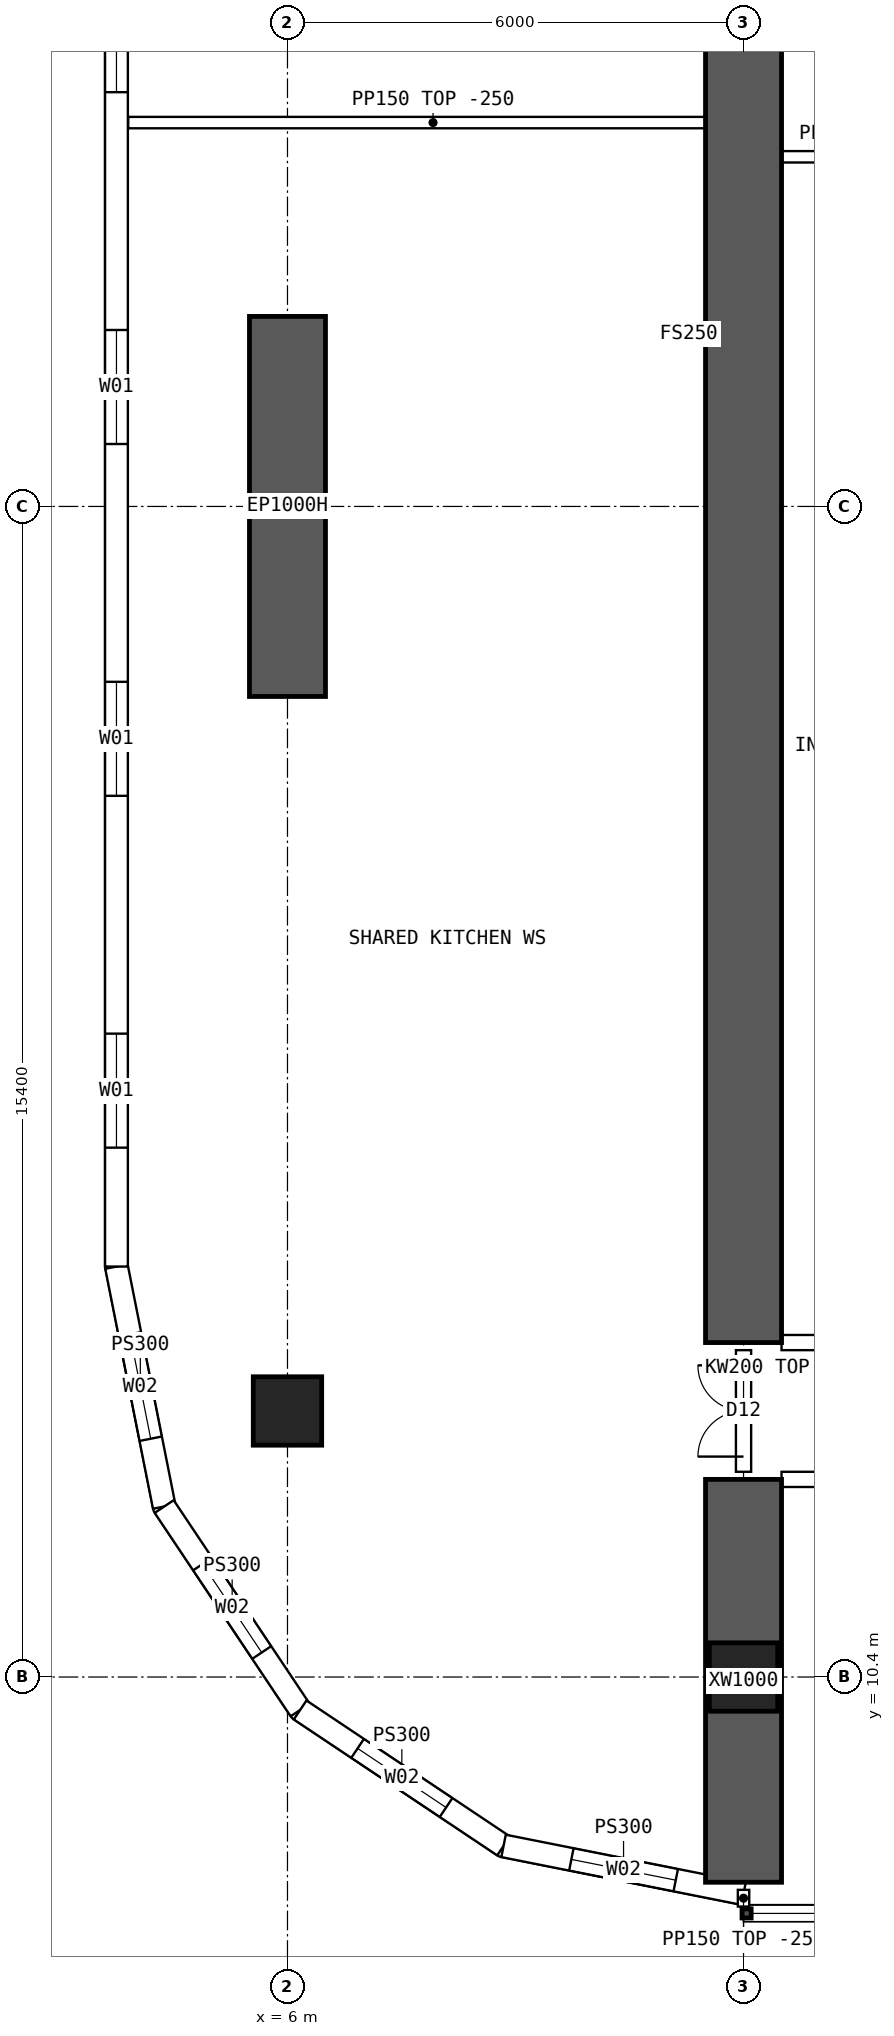
"""IFC4 building model, lengths in metres.
Left out: names, types, materials, properties, quantities, classifications, styles, units other than length and angle.
Written with IfcOpenShell. Run it as: python <this file> out.ifc"""

import sys

from ifc_helpers import new_model, si_unit, direction, frame, frame_2d, origin, origin_2d, place, context, subcontext, project, spatial, polyline, rectangle, hollow_rectangle, outline, extrude, element, fill, save


model = new_model("IFC4")
c1 = context("Model", 3, precision=1e-05, world=origin(), true_north=direction((0.0, 1.0)))
c2 = subcontext(c1, "Body", "Model", "MODEL_VIEW")
j1 = project(units=[si_unit("LENGTHUNIT", "METRE"), si_unit("PLANEANGLEUNIT", "RADIAN")], contexts=[c1])
p1 = place(None, origin())
s1 = spatial("IfcSite", under=j1, at=p1, CompositionType="ELEMENT")
p2 = place(p1, origin())
s2 = spatial("IfcBuilding", under=s1, at=p2, CompositionType="ELEMENT")
p3 = place(p2, frame((0.0, 0.0, 57.7)))
s3 = spatial("IfcBuildingStorey", under=s2, at=p3, CompositionType="ELEMENT", Elevation=57.7)
for number, where, z_axis, x_axis in (
    (1, (12.0, 10.4, 0.0), (0.0, 0.0, 1.0), (1.0, 0.0, 0.0)),
    (2, (6.0, 13.9, 0.0), (0.0, 0.0, 1.0), (1.0, 0.0, 0.0)),
):
    element("IfcColumn", number, at=place(p3, frame(where, z_axis=z_axis, x_axis=x_axis)), inside=s3, PredefinedType="COLUMN", context=c2, shape_type="SweptSolid", body=[
        extrude(hollow_rectangle(XDim=0.9, YDim=0.9, WallThickness=0.09, at=origin_2d()), origin(), (0.0, 0.0, 1.0), 3.75),
    ])
p4 = place(p3, frame((6.0, 23.3, 0.0), z_axis=(0.0, 0.0, 1.0), x_axis=(0.0, 1.0, 0.0)))
e3 = element("IfcWall", 3, at=p4, inside=s3, PredefinedType="SHEAR", context=c2, shape_type="SweptSolid", body=[
    extrude(rectangle(XDim=5.0, YDim=1.0, at=frame_2d((2.5, 0.0))), origin(), (0.0, 0.0, 1.0), 3.75),
])
p5 = place(p3, frame((12.0, 7.7, 0.0), z_axis=(0.0, 0.0, 1.0), x_axis=(0.0, 1.0, 0.0)))
e4 = element("IfcWall", 4, at=p5, inside=s3, PredefinedType="SHEAR", context=c2, shape_type="SweptSolid", body=[
    extrude(rectangle(XDim=5.3, YDim=1.0, at=frame_2d((2.65, 0.0))), origin(), (0.0, 0.0, 1.0), 3.75),
])
p6 = place(p3, frame((12.0, 14.8, 0.0), z_axis=(0.0, 0.0, 1.0), x_axis=(0.0, 1.0, 0.0)))
e5 = element("IfcWall", 5, at=p6, inside=s3, PredefinedType="SHEAR", context=c2, shape_type="SweptSolid", body=[
    extrude(rectangle(XDim=34.4, YDim=1.0, at=frame_2d((17.2, 0.0))), origin(), (0.0, 0.0, 1.0), 3.75),
])
p7 = place(p3, frame((3.75, 48.2, 0.0), z_axis=(0.0, 0.0, 1.0), x_axis=(0.0, -1.0, 0.0)))
e6 = element("IfcWall", 6, at=p7, inside=s3, PredefinedType="SOLIDWALL", context=c2, shape_type="SweptSolid", body=[
    extrude(outline(polyline([(-0.015, -0.15), (32.415, -0.15), (32.385, 0.15), (0.015, 0.15), (-0.015, -0.15)])), origin(), (0.0, 0.0, 1.0), 3.5),
])
p8 = place(p7, frame((1.564, 0.0, 0.9)))
e7 = element("IfcOpeningElement", 7, at=p8, cuts=e6, PredefinedType="OPENING", context=c2, shape_type="SweptSolid", body=[
    extrude(rectangle(XDim=1.5, YDim=2.0, at=frame_2d((0.75, 1.0))), frame((0.0, 0.16, 0.0), z_axis=(0.0, -1.0, 0.0), x_axis=(1.0, 0.0, 0.0)), (0.0, 0.0, 1.0), 0.32),
])
p9 = place(p7, frame((6.193, 0.0, 0.9)))
e8 = element("IfcOpeningElement", 8, at=p9, cuts=e6, PredefinedType="OPENING", context=c2, shape_type="SweptSolid", body=[
    extrude(rectangle(XDim=1.5, YDim=2.0, at=frame_2d((0.75, 1.0))), frame((0.0, 0.16, 0.0), z_axis=(0.0, -1.0, 0.0), x_axis=(1.0, 0.0, 0.0)), (0.0, 0.0, 1.0), 0.32),
])
p10 = place(p7, frame((10.822, 0.0, 0.9)))
e9 = element("IfcOpeningElement", 9, at=p10, cuts=e6, PredefinedType="OPENING", context=c2, shape_type="SweptSolid", body=[
    extrude(rectangle(XDim=1.5, YDim=2.0, at=frame_2d((0.75, 1.0))), frame((0.0, 0.16, 0.0), z_axis=(0.0, -1.0, 0.0), x_axis=(1.0, 0.0, 0.0)), (0.0, 0.0, 1.0), 0.32),
])
p11 = place(p7, frame((15.45, 0.0, 0.9)))
e10 = element("IfcOpeningElement", 10, at=p11, cuts=e6, PredefinedType="OPENING", context=c2, shape_type="SweptSolid", body=[
    extrude(rectangle(XDim=1.5, YDim=2.0, at=frame_2d((0.75, 1.0))), frame((0.0, 0.16, 0.0), z_axis=(0.0, -1.0, 0.0), x_axis=(1.0, 0.0, 0.0)), (0.0, 0.0, 1.0), 0.32),
])
p12 = place(p7, frame((20.079, 0.0, 0.9)))
e11 = element("IfcOpeningElement", 11, at=p12, cuts=e6, PredefinedType="OPENING", context=c2, shape_type="SweptSolid", body=[
    extrude(rectangle(XDim=1.5, YDim=2.0, at=frame_2d((0.75, 1.0))), frame((0.0, 0.16, 0.0), z_axis=(0.0, -1.0, 0.0), x_axis=(1.0, 0.0, 0.0)), (0.0, 0.0, 1.0), 0.32),
])
p13 = place(p7, frame((24.707, 0.0, 0.9)))
e12 = element("IfcOpeningElement", 12, at=p13, cuts=e6, PredefinedType="OPENING", context=c2, shape_type="SweptSolid", body=[
    extrude(rectangle(XDim=1.5, YDim=2.0, at=frame_2d((0.75, 1.0))), frame((0.0, 0.16, 0.0), z_axis=(0.0, -1.0, 0.0), x_axis=(1.0, 0.0, 0.0)), (0.0, 0.0, 1.0), 0.32),
])
p14 = place(p7, frame((29.336, 0.0, 0.9)))
e13 = element("IfcOpeningElement", 13, at=p14, cuts=e6, PredefinedType="OPENING", context=c2, shape_type="SweptSolid", body=[
    extrude(rectangle(XDim=1.5, YDim=2.0, at=frame_2d((0.75, 1.0))), frame((0.0, 0.16, 0.0), z_axis=(0.0, -1.0, 0.0), x_axis=(1.0, 0.0, 0.0)), (0.0, 0.0, 1.0), 0.32),
])
p15 = place(p3, frame((3.75, 15.8, 0.0), z_axis=(0.0, 0.0, 1.0), x_axis=(0.195065901187, -0.980790137692, 0.0)))
e14 = element("IfcWall", 14, at=p15, inside=s3, PredefinedType="SOLIDWALL", context=c2, shape_type="SweptSolid", body=[
    extrude(outline(polyline([(-0.015, -0.15), (3.249, -0.15), (3.189, 0.15), (0.015, 0.15), (-0.015, -0.15)])), origin(), (0.0, 0.0, 1.0), 3.5),
])
p16 = place(p15, frame((0.909, 0.0, 0.9)))
e15 = element("IfcOpeningElement", 15, at=p16, cuts=e14, PredefinedType="OPENING", context=c2, shape_type="SweptSolid", body=[
    extrude(rectangle(XDim=1.4, YDim=1.8, at=frame_2d((0.7, 0.9))), frame((0.0, 0.16, 0.0), z_axis=(0.0, -1.0, 0.0), x_axis=(1.0, 0.0, 0.0)), (0.0, 0.0, 1.0), 0.32),
])
p17 = place(p3, frame((4.378, 12.643, 0.0), z_axis=(0.0, 0.0, 1.0), x_axis=(0.555609954424, -0.831443069936, 0.0)))
e16 = element("IfcWall", 16, at=p17, inside=s3, PredefinedType="SOLIDWALL", context=c2, shape_type="SweptSolid", body=[
    extrude(outline(polyline([(-0.03, -0.15), (3.249, -0.15), (3.189, 0.15), (0.03, 0.15), (-0.03, -0.15)])), origin(), (0.0, 0.0, 1.0), 3.5),
])
p18 = place(p17, frame((0.909, 0.0, 0.9)))
e17 = element("IfcOpeningElement", 17, at=p18, cuts=e16, PredefinedType="OPENING", context=c2, shape_type="SweptSolid", body=[
    extrude(rectangle(XDim=1.4, YDim=1.8, at=frame_2d((0.7, 0.9))), frame((0.0, 0.16, 0.0), z_axis=(0.0, -1.0, 0.0), x_axis=(1.0, 0.0, 0.0)), (0.0, 0.0, 1.0), 0.32),
])
p19 = place(p3, frame((6.167, 9.966, 0.0), z_axis=(0.0, 0.0, 1.0), x_axis=(0.831478105043, -0.555557522525, 0.0)))
e18 = element("IfcWall", 18, at=p19, inside=s3, PredefinedType="SOLIDWALL", context=c2, shape_type="SweptSolid", body=[
    extrude(outline(polyline([(-0.03, -0.15), (3.249, -0.15), (3.189, 0.15), (0.03, 0.15), (-0.03, -0.15)])), origin(), (0.0, 0.0, 1.0), 3.5),
])
p20 = place(p19, frame((0.909, 0.0, 0.9)))
e19 = element("IfcOpeningElement", 19, at=p20, cuts=e18, PredefinedType="OPENING", context=c2, shape_type="SweptSolid", body=[
    extrude(rectangle(XDim=1.4, YDim=1.8, at=frame_2d((0.7, 0.9))), frame((0.0, 0.16, 0.0), z_axis=(0.0, -1.0, 0.0), x_axis=(1.0, 0.0, 0.0)), (0.0, 0.0, 1.0), 0.32),
])
p21 = place(p3, frame((8.843, 8.178, 0.0), z_axis=(0.0, 0.0, 1.0), x_axis=(0.980787251524, -0.195080412259, 0.0)))
e20 = element("IfcWall", 20, at=p21, inside=s3, PredefinedType="SOLIDWALL", context=c2, shape_type="SweptSolid", body=[
    extrude(outline(polyline([(-0.03, -0.15), (3.249, -0.15), (3.189, 0.15), (0.03, 0.15), (-0.03, -0.15)])), origin(), (0.0, 0.0, 1.0), 3.5),
])
p22 = place(p21, frame((0.909, 0.0, 0.9)))
e21 = element("IfcOpeningElement", 21, at=p22, cuts=e20, PredefinedType="OPENING", context=c2, shape_type="SweptSolid", body=[
    extrude(rectangle(XDim=1.4, YDim=1.8, at=frame_2d((0.7, 0.9))), frame((0.0, 0.16, 0.0), z_axis=(0.0, -1.0, 0.0), x_axis=(1.0, 0.0, 0.0)), (0.0, 0.0, 1.0), 0.32),
])
p23 = place(p3, frame((12.5, 13.0, 0.0), z_axis=(0.0, 0.0, 1.0), x_axis=(1.0, 0.0, 0.0)))
e22 = element("IfcWall", 22, at=p23, inside=s3, PredefinedType="SOLIDWALL", context=c2, shape_type="SweptSolid", body=[
    extrude(outline(polyline([(0.0, 0.0), (5.0, 0.0), (5.0, 3.1), (0.0, 3.1), (0.0, 0.0)])), frame((0.0, 0.1, 0.0), z_axis=(0.0, -1.0, 0.0), x_axis=(1.0, 0.0, 0.0)), (0.0, 0.0, 1.0), 0.2),
])
p24 = place(p23, frame((0.6, 0.0, 0.0)))
e23 = element("IfcOpeningElement", 23, at=p24, cuts=e22, PredefinedType="OPENING", context=c2, shape_type="SweptSolid", body=[
    extrude(rectangle(XDim=1.0, YDim=2.1, at=frame_2d((0.5, 1.05))), frame((0.0, 0.11, 0.0), z_axis=(0.0, -1.0, 0.0), x_axis=(1.0, 0.0, 0.0)), (0.0, 0.0, 1.0), 0.22),
])
p25 = place(p3, frame((12.5, 14.8, 0.0), z_axis=(0.0, 0.0, 1.0), x_axis=(1.0, 0.0, 0.0)))
e24 = element("IfcWall", 24, at=p25, inside=s3, PredefinedType="SOLIDWALL", context=c2, shape_type="SweptSolid", body=[
    extrude(rectangle(XDim=5.0, YDim=0.2, at=frame_2d((2.5, 0.0))), origin(), (0.0, 0.0, 1.0), 3.5),
])
p26 = place(p25, frame((3.3, 0.0, 0.0)))
e25 = element("IfcOpeningElement", 25, at=p26, cuts=e24, PredefinedType="OPENING", context=c2, shape_type="SweptSolid", body=[
    extrude(rectangle(XDim=1.6, YDim=2.1, at=frame_2d((0.8, 1.05))), frame((0.0, 0.11, 0.0), z_axis=(0.0, -1.0, 0.0), x_axis=(1.0, 0.0, 0.0)), (0.0, 0.0, 1.0), 0.22),
])
p27 = place(p3, frame((12.0, 30.4, 0.0), z_axis=(0.0, 0.0, 1.0), x_axis=(1.0, 0.0, 0.0)))
e26 = element("IfcWall", 26, at=p27, inside=s3, PredefinedType="PARTITIONING", context=c2, shape_type="SweptSolid", body=[
    extrude(rectangle(XDim=3.6, YDim=0.15, at=frame_2d((1.8, 0.0))), origin(), (0.0, 0.0, 1.0), 3.5),
])
p28 = place(p3, frame((3.905, 30.85, 0.0), z_axis=(0.0, 0.0, 1.0), x_axis=(1.0, 0.0, 0.0)))
e27 = element("IfcWall", 27, at=p28, inside=s3, PredefinedType="PARTITIONING", context=c2, shape_type="SweptSolid", body=[
    extrude(outline(polyline([(0.0, 0.0), (8.02, 0.0), (8.02, 3.5), (2.397, 3.5), (2.395, 3.05), (1.797, 3.05), (1.795, 3.5), (0.0, 3.5), (0.0, 0.0)])), frame((0.0, 0.075, 0.0), z_axis=(0.0, -1.0, 0.0), x_axis=(1.0, 0.0, 0.0)), (0.0, 0.0, 1.0), 0.15),
])
p29 = place(p3, frame((12.0, 13.1, 0.0), z_axis=(0.0, 0.0, 1.0), x_axis=(0.0, 1.0, 0.0)))
e28 = element("IfcWall", 28, at=p29, inside=s3, PredefinedType="SOLIDWALL", context=c2, shape_type="SweptSolid", body=[
    extrude(outline(polyline([(0.0, 0.0), (1.6, 0.0), (1.6, 3.05), (0.0, 3.05), (0.0, 0.0)])), frame((0.0, 0.1, 0.0), z_axis=(0.0, -1.0, 0.0), x_axis=(1.0, 0.0, 0.0)), (0.0, 0.0, 1.0), 0.2),
])
p30 = place(p29, frame((0.2, 0.0, 0.0)))
e29 = element("IfcOpeningElement", 29, at=p30, cuts=e28, PredefinedType="OPENING", context=c2, shape_type="SweptSolid", body=[
    extrude(rectangle(XDim=1.2, YDim=2.1, at=frame_2d((0.6, 1.05))), frame((0.0, 0.11, 0.0), z_axis=(0.0, -1.0, 0.0), x_axis=(1.0, 0.0, 0.0)), (0.0, 0.0, 1.0), 0.22),
])
p31 = place(p3, frame((12.0, 7.6, 0.0), z_axis=(0.0, 0.0, 1.0), x_axis=(0.0, -1.0, 0.0)))
e30 = element("IfcWall", 30, at=p31, inside=s3, PredefinedType="PARTITIONING", context=c2, shape_type="SweptSolid", body=[
    extrude(rectangle(XDim=0.22, YDim=0.15, at=frame_2d((0.11, 0.0))), origin(), (0.0, 0.0, 1.0), 3.5),
])
p32 = place(p11, origin())
e31 = element("IfcWindow", 31, at=p32, inside=s3, PartitioningType="SINGLE_PANEL", PredefinedType="WINDOW", context=c2, shape_type="SweptSolid", body=[
    extrude(rectangle(XDim=1.5, YDim=2.0, at=frame_2d((0.75, 1.0))), frame((0.0, 0.03, 0.0), z_axis=(0.0, -1.0, 0.0), x_axis=(1.0, 0.0, 0.0)), (0.0, 0.0, 1.0), 0.06),
])
fill(e10, e31)
p33 = place(p12, origin())
e32 = element("IfcWindow", 32, at=p33, inside=s3, PartitioningType="SINGLE_PANEL", PredefinedType="WINDOW", context=c2, shape_type="SweptSolid", body=[
    extrude(rectangle(XDim=1.5, YDim=2.0, at=frame_2d((0.75, 1.0))), frame((0.0, 0.03, 0.0), z_axis=(0.0, -1.0, 0.0), x_axis=(1.0, 0.0, 0.0)), (0.0, 0.0, 1.0), 0.06),
])
fill(e11, e32)
p34 = place(p13, origin())
e33 = element("IfcWindow", 33, at=p34, inside=s3, PartitioningType="SINGLE_PANEL", PredefinedType="WINDOW", context=c2, shape_type="SweptSolid", body=[
    extrude(rectangle(XDim=1.5, YDim=2.0, at=frame_2d((0.75, 1.0))), frame((0.0, 0.03, 0.0), z_axis=(0.0, -1.0, 0.0), x_axis=(1.0, 0.0, 0.0)), (0.0, 0.0, 1.0), 0.06),
])
fill(e12, e33)
p35 = place(p14, origin())
e34 = element("IfcWindow", 34, at=p35, inside=s3, PartitioningType="SINGLE_PANEL", PredefinedType="WINDOW", context=c2, shape_type="SweptSolid", body=[
    extrude(rectangle(XDim=1.5, YDim=2.0, at=frame_2d((0.75, 1.0))), frame((0.0, 0.03, 0.0), z_axis=(0.0, -1.0, 0.0), x_axis=(1.0, 0.0, 0.0)), (0.0, 0.0, 1.0), 0.06),
])
fill(e13, e34)
p36 = place(p16, origin())
e35 = element("IfcWindow", 35, at=p36, inside=s3, PartitioningType="SINGLE_PANEL", PredefinedType="WINDOW", context=c2, shape_type="SweptSolid", body=[
    extrude(rectangle(XDim=1.4, YDim=1.8, at=frame_2d((0.7, 0.9))), frame((0.0, 0.03, 0.0), z_axis=(0.0, -1.0, 0.0), x_axis=(1.0, 0.0, 0.0)), (0.0, 0.0, 1.0), 0.06),
])
fill(e15, e35)
p37 = place(p18, origin())
e36 = element("IfcWindow", 36, at=p37, inside=s3, PartitioningType="SINGLE_PANEL", PredefinedType="WINDOW", context=c2, shape_type="SweptSolid", body=[
    extrude(rectangle(XDim=1.4, YDim=1.8, at=frame_2d((0.7, 0.9))), frame((0.0, 0.03, 0.0), z_axis=(0.0, -1.0, 0.0), x_axis=(1.0, 0.0, 0.0)), (0.0, 0.0, 1.0), 0.06),
])
fill(e17, e36)
p38 = place(p20, origin())
e37 = element("IfcWindow", 37, at=p38, inside=s3, PartitioningType="SINGLE_PANEL", PredefinedType="WINDOW", context=c2, shape_type="SweptSolid", body=[
    extrude(rectangle(XDim=1.4, YDim=1.8, at=frame_2d((0.7, 0.9))), frame((0.0, 0.03, 0.0), z_axis=(0.0, -1.0, 0.0), x_axis=(1.0, 0.0, 0.0)), (0.0, 0.0, 1.0), 0.06),
])
fill(e19, e37)
p39 = place(p22, origin())
e38 = element("IfcWindow", 38, at=p39, inside=s3, PartitioningType="SINGLE_PANEL", PredefinedType="WINDOW", context=c2, shape_type="SweptSolid", body=[
    extrude(rectangle(XDim=1.4, YDim=1.8, at=frame_2d((0.7, 0.9))), frame((0.0, 0.03, 0.0), z_axis=(0.0, -1.0, 0.0), x_axis=(1.0, 0.0, 0.0)), (0.0, 0.0, 1.0), 0.06),
])
fill(e21, e38)
p40 = place(p30, origin())
e39 = element("IfcDoor", 39, at=p40, inside=s3, OperationType="DOUBLE_DOOR_SINGLE_SWING", PredefinedType="DOOR", context=c2, shape_type="SweptSolid", body=[
    extrude(rectangle(XDim=1.2, YDim=2.1, at=frame_2d((0.6, 1.05))), frame((0.0, 0.025, 0.0), z_axis=(0.0, -1.0, 0.0), x_axis=(1.0, 0.0, 0.0)), (0.0, 0.0, 1.0), 0.05),
])
fill(e29, e39)
save(model, sys.argv[1])
